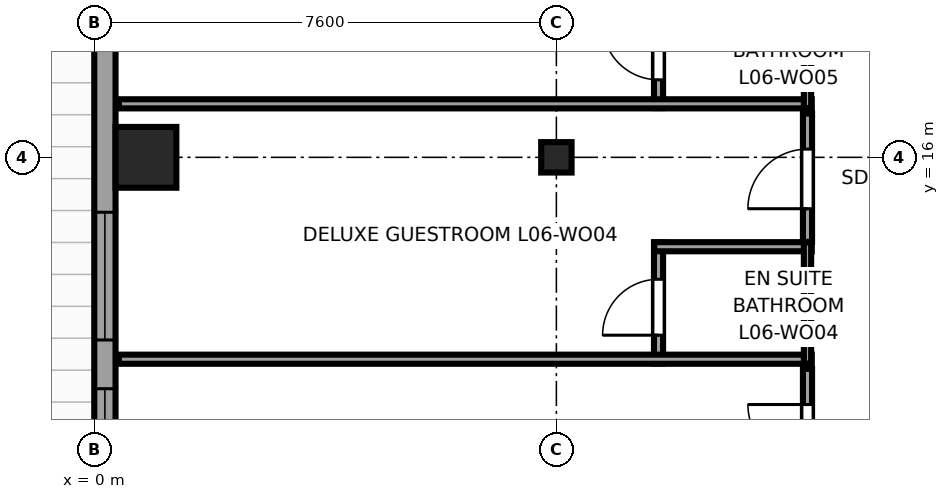
"""IFC4 building model, lengths in metres.
Left out: names, types, materials, properties, quantities, classifications, styles, units other than length and angle.
Written with IfcOpenShell. Run it as: python <this file> out.ifc"""

import sys

from ifc_helpers import new_model, si_unit, direction, frame, frame_2d, origin, origin_2d, place, context, subcontext, project, spatial, rectangle, i_section, extrude, source, transform, mapped, element, fill, save


model = new_model("IFC4")
c1 = context("Model", 3, precision=1e-05, world=origin(), true_north=direction((0.0, 1.0)))
c2 = subcontext(c1, "Body", "Model", "MODEL_VIEW")
j1 = project(units=[si_unit("LENGTHUNIT", "METRE"), si_unit("PLANEANGLEUNIT", "RADIAN")], contexts=[c1])
p1 = place(None, origin())
s1 = spatial("IfcSite", under=j1, at=p1, CompositionType="ELEMENT")
p2 = place(p1, origin())
s2 = spatial("IfcBuilding", under=s1, at=p2, CompositionType="ELEMENT")
p3 = place(p2, frame((0.0, 0.0, 32.0)))
s3 = spatial("IfcBuildingStorey", under=s2, at=p3, CompositionType="ELEMENT", Elevation=32.0)
m1 = source(origin(), c2, "Body", "SweptSolid", [
    extrude(rectangle(XDim=1.0, YDim=1.0, at=origin_2d()), origin(), (0.0, 0.0, 1.0), 3.55),
])
p4 = place(p3, frame((0.85, 16.0, 0.0), z_axis=(0.0, 0.0, 1.0), x_axis=(1.0, 0.0, 0.0)))
e1 = element("IfcColumn", 1, at=p4, inside=s3, PredefinedType="COLUMN", context=c2, shape_type="MappedRepresentation", body=[
    mapped(m1, transform((0.0, 0.0, 0.0), x_axis=(1.0, 0.0, 0.0), y_axis=(0.0, 1.0, 0.0), z_axis=(0.0, 0.0, 1.0), scale=1.0)),
])
m2 = source(origin(), c2, "Body", "SweptSolid", [
    extrude(i_section(OverallWidth=0.5, OverallDepth=0.5, WebThickness=0.028, FlangeThickness=0.045, at=origin_2d()), origin(), (0.0, 0.0, 1.0), 3.55),
])
p5 = place(p3, frame((7.6, 16.0, 0.0), z_axis=(0.0, 0.0, 1.0), x_axis=(1.0, 0.0, 0.0)))
e2 = element("IfcColumn", 2, at=p5, inside=s3, PredefinedType="COLUMN", context=c2, shape_type="MappedRepresentation", body=[
    mapped(m2, transform((0.0, 0.0, 0.0), x_axis=(1.0, 0.0, 0.0), y_axis=(0.0, 1.0, 0.0), z_axis=(0.0, 0.0, 1.0), scale=1.0)),
])
p6 = place(p3, frame((0.175, 41.383, 0.0), z_axis=(0.0, 0.0, 1.0), x_axis=(0.0, -1.0, 0.0)))
e3 = element("IfcWall", 3, at=p6, inside=s3, PredefinedType="SOLIDWALL", context=c2, shape_type="SweptSolid", body=[
    extrude(rectangle(XDim=36.766, YDim=0.35, at=frame_2d((18.383, 0.0))), origin(), (0.0, 0.0, 1.0), 3.37),
])
p7 = place(p6, frame((1.526, 0.0, 0.68)))
e4 = element("IfcOpeningElement", 4, at=p7, cuts=e3, PredefinedType="OPENING", context=c2, shape_type="SweptSolid", body=[
    extrude(rectangle(XDim=2.1, YDim=1.9, at=frame_2d((1.05, 0.95))), frame((0.0, 0.185, 0.0), z_axis=(0.0, -1.0, 0.0), x_axis=(1.0, 0.0, 0.0)), (0.0, 0.0, 1.0), 0.37),
])
p8 = place(p6, frame((4.428, 0.0, 0.68)))
e5 = element("IfcOpeningElement", 5, at=p8, cuts=e3, PredefinedType="OPENING", context=c2, shape_type="SweptSolid", body=[
    extrude(rectangle(XDim=2.1, YDim=1.9, at=frame_2d((1.05, 0.95))), frame((0.0, 0.185, 0.0), z_axis=(0.0, -1.0, 0.0), x_axis=(1.0, 0.0, 0.0)), (0.0, 0.0, 1.0), 0.37),
])
p9 = place(p6, frame((13.381, 0.0, 0.68)))
e6 = element("IfcOpeningElement", 6, at=p9, cuts=e3, PredefinedType="OPENING", context=c2, shape_type="SweptSolid", body=[
    extrude(rectangle(XDim=2.1, YDim=1.9, at=frame_2d((1.05, 0.95))), frame((0.0, 0.185, 0.0), z_axis=(0.0, -1.0, 0.0), x_axis=(1.0, 0.0, 0.0)), (0.0, 0.0, 1.0), 0.37),
])
p10 = place(p6, frame((21.285, 0.0, 0.68)))
e7 = element("IfcOpeningElement", 7, at=p10, cuts=e3, PredefinedType="OPENING", context=c2, shape_type="SweptSolid", body=[
    extrude(rectangle(XDim=2.1, YDim=1.9, at=frame_2d((1.05, 0.95))), frame((0.0, 0.185, 0.0), z_axis=(0.0, -1.0, 0.0), x_axis=(1.0, 0.0, 0.0)), (0.0, 0.0, 1.0), 0.37),
])
p11 = place(p6, frame((26.286, 0.0, 0.68)))
e8 = element("IfcOpeningElement", 8, at=p11, cuts=e3, PredefinedType="OPENING", context=c2, shape_type="SweptSolid", body=[
    extrude(rectangle(XDim=2.1, YDim=1.9, at=frame_2d((1.05, 0.95))), frame((0.0, 0.185, 0.0), z_axis=(0.0, -1.0, 0.0), x_axis=(1.0, 0.0, 0.0)), (0.0, 0.0, 1.0), 0.37),
])
p12 = place(p6, frame((29.188, 0.0, 0.68)))
e9 = element("IfcOpeningElement", 9, at=p12, cuts=e3, PredefinedType="OPENING", context=c2, shape_type="SweptSolid", body=[
    extrude(rectangle(XDim=2.1, YDim=1.9, at=frame_2d((1.05, 0.95))), frame((0.0, 0.185, 0.0), z_axis=(0.0, -1.0, 0.0), x_axis=(1.0, 0.0, 0.0)), (0.0, 0.0, 1.0), 0.37),
])
p13 = place(p6, frame((34.079, 0.0, 0.62)))
e10 = element("IfcOpeningElement", 10, at=p13, cuts=e3, PredefinedType="OPENING", context=c2, shape_type="SweptSolid", body=[
    extrude(rectangle(XDim=1.5, YDim=1.55, at=frame_2d((0.75, 0.775))), frame((0.0, 0.185, 0.0), z_axis=(0.0, -1.0, 0.0), x_axis=(1.0, 0.0, 0.0)), (0.0, 0.0, 1.0), 0.37),
])
p14 = place(p3, frame((9.28, 12.61, 0.0), z_axis=(0.0, 0.0, 1.0), x_axis=(0.0, 1.0, 0.0)))
e11 = element("IfcWall", 11, at=p14, inside=s3, PredefinedType="PARTITIONING", context=c2, shape_type="SweptSolid", body=[
    extrude(rectangle(XDim=1.99, YDim=0.15, at=frame_2d((0.995, 0.0))), origin(), (0.0, 0.0, 1.0), 3.37),
])
p15 = place(p14, frame((0.465, 0.0, 0.0)))
e12 = element("IfcOpeningElement", 12, at=p15, cuts=e11, PredefinedType="OPENING", context=c2, shape_type="SweptSolid", body=[
    extrude(rectangle(XDim=0.92, YDim=2.01, at=frame_2d((0.46, 1.005))), frame((0.0, 0.085, 0.0), z_axis=(0.0, -1.0, 0.0), x_axis=(1.0, 0.0, 0.0)), (0.0, 0.0, 1.0), 0.17),
])
p16 = place(p3, frame((0.405, 12.68, 0.0), z_axis=(0.0, 0.0, 1.0), x_axis=(1.0, 0.0, 0.0)))
e13 = element("IfcWall", 13, at=p16, inside=s3, PredefinedType="PARTITIONING", context=c2, shape_type="SweptSolid", body=[
    extrude(rectangle(XDim=11.395, YDim=0.15, at=frame_2d((5.698, 0.0))), origin(), (0.0, 0.0, 1.0), 3.37),
])
p17 = place(p3, frame((9.21, 14.53, 0.0), z_axis=(0.0, 0.0, 1.0), x_axis=(1.0, 0.0, 0.0)))
e14 = element("IfcWall", 14, at=p17, inside=s3, PredefinedType="PARTITIONING", context=c2, shape_type="SweptSolid", body=[
    extrude(rectangle(XDim=2.59, YDim=0.15, at=frame_2d((1.295, 0.0))), origin(), (0.0, 0.0, 1.0), 3.37),
])
p18 = place(p3, frame((11.73, 12.61, 0.0), z_axis=(0.0, 0.0, 1.0), x_axis=(0.0, 1.0, 0.0)))
e15 = element("IfcWall", 15, at=p18, inside=s3, PredefinedType="PLUMBINGWALL", context=c2, shape_type="SweptSolid", body=[
    extrude(rectangle(XDim=1.99, YDim=0.12, at=frame_2d((0.995, 0.0))), origin(), (0.0, 0.0, 1.0), 3.37),
])
p19 = place(p3, frame((9.28, 16.81, 0.0), z_axis=(0.0, 0.0, 1.0), x_axis=(0.0, 1.0, 0.0)))
e16 = element("IfcWall", 16, at=p19, inside=s3, PredefinedType="PARTITIONING", context=c2, shape_type="SweptSolid", body=[
    extrude(rectangle(XDim=1.99, YDim=0.15, at=frame_2d((0.995, 0.0))), origin(), (0.0, 0.0, 1.0), 3.37),
])
p20 = place(p19, frame((0.465, 0.0, 0.0)))
e17 = element("IfcOpeningElement", 17, at=p20, cuts=e16, PredefinedType="OPENING", context=c2, shape_type="SweptSolid", body=[
    extrude(rectangle(XDim=0.92, YDim=2.01, at=frame_2d((0.46, 1.005))), frame((0.0, 0.085, 0.0), z_axis=(0.0, -1.0, 0.0), x_axis=(1.0, 0.0, 0.0)), (0.0, 0.0, 1.0), 0.17),
])
p21 = place(p3, frame((0.405, 16.88, 0.0), z_axis=(0.0, 0.0, 1.0), x_axis=(1.0, 0.0, 0.0)))
e18 = element("IfcWall", 18, at=p21, inside=s3, PredefinedType="PARTITIONING", context=c2, shape_type="SweptSolid", body=[
    extrude(rectangle(XDim=11.395, YDim=0.15, at=frame_2d((5.698, 0.0))), origin(), (0.0, 0.0, 1.0), 3.37),
])
p22 = place(p3, frame((11.73, 16.81, 0.0), z_axis=(0.0, 0.0, 1.0), x_axis=(0.0, 1.0, 0.0)))
e19 = element("IfcWall", 19, at=p22, inside=s3, PredefinedType="PLUMBINGWALL", context=c2, shape_type="SweptSolid", body=[
    extrude(rectangle(XDim=1.99, YDim=0.12, at=frame_2d((0.995, 0.0))), origin(), (0.0, 0.0, 1.0), 3.37),
])
p23 = place(p3, frame((11.73, 10.41, 0.0), z_axis=(0.0, 0.0, 1.0), x_axis=(0.0, 1.0, 0.0)))
e20 = element("IfcWall", 20, at=p23, inside=s3, PredefinedType="PARTITIONING", context=c2, shape_type="SweptSolid", body=[
    extrude(rectangle(XDim=2.11, YDim=0.15, at=frame_2d((1.055, 0.0))), origin(), (0.0, 0.0, 1.0), 3.37),
])
p24 = place(p23, frame((0.545, 0.0, 0.0)))
e21 = element("IfcOpeningElement", 21, at=p24, cuts=e20, PredefinedType="OPENING", context=c2, shape_type="SweptSolid", body=[
    extrude(rectangle(XDim=0.98, YDim=2.12, at=frame_2d((0.49, 1.06))), frame((0.0, 0.085, 0.0), z_axis=(0.0, -1.0, 0.0), x_axis=(1.0, 0.0, 0.0)), (0.0, 0.0, 1.0), 0.17),
])
p25 = place(p3, frame((11.73, 14.61, 0.0), z_axis=(0.0, 0.0, 1.0), x_axis=(0.0, 1.0, 0.0)))
e22 = element("IfcWall", 22, at=p25, inside=s3, PredefinedType="PARTITIONING", context=c2, shape_type="SweptSolid", body=[
    extrude(rectangle(XDim=2.11, YDim=0.15, at=frame_2d((1.055, 0.0))), origin(), (0.0, 0.0, 1.0), 3.37),
])
p26 = place(p25, frame((0.545, 0.0, 0.0)))
e23 = element("IfcOpeningElement", 23, at=p26, cuts=e22, PredefinedType="OPENING", context=c2, shape_type="SweptSolid", body=[
    extrude(rectangle(XDim=0.98, YDim=2.12, at=frame_2d((0.49, 1.06))), frame((0.0, 0.085, 0.0), z_axis=(0.0, -1.0, 0.0), x_axis=(1.0, 0.0, 0.0)), (0.0, 0.0, 1.0), 0.17),
])
m3 = source(origin(), c2, "Body", "SweptSolid", [
    extrude(rectangle(XDim=2.1, YDim=1.9, at=frame_2d((1.05, 0.95))), frame((0.0, 0.09, 0.0), z_axis=(0.0, -1.0, 0.0), x_axis=(1.0, 0.0, 0.0)), (0.0, 0.0, 1.0), 0.06),
])
p27 = place(p11, origin())
e24 = element("IfcWindow", 24, at=p27, inside=s3, PartitioningType="TRIPLE_PANEL_HORIZONTAL", PredefinedType="WINDOW", context=c2, shape_type="MappedRepresentation", body=[
    mapped(m3, transform((0.0, 0.0, 0.0), x_axis=(1.0, 0.0, 0.0), y_axis=(0.0, 1.0, 0.0), z_axis=(0.0, 0.0, 1.0), scale=1.0)),
])
fill(e8, e24)
p28 = place(p12, origin())
e25 = element("IfcWindow", 25, at=p28, inside=s3, PartitioningType="TRIPLE_PANEL_HORIZONTAL", PredefinedType="WINDOW", context=c2, shape_type="MappedRepresentation", body=[
    mapped(m3, transform((0.0, 0.0, 0.0), x_axis=(1.0, 0.0, 0.0), y_axis=(0.0, 1.0, 0.0), z_axis=(0.0, 0.0, 1.0), scale=1.0)),
])
fill(e9, e25)
m4 = source(origin(), c2, "Body", "SweptSolid", [
    extrude(rectangle(XDim=0.92, YDim=2.01, at=frame_2d((0.46, 1.005))), frame((0.0, 0.025, 0.0), z_axis=(0.0, -1.0, 0.0), x_axis=(1.0, 0.0, 0.0)), (0.0, 0.0, 1.0), 0.05),
])
p29 = place(p15, origin())
e26 = element("IfcDoor", 26, at=p29, inside=s3, OperationType="SINGLE_SWING_LEFT", PredefinedType="DOOR", context=c2, shape_type="MappedRepresentation", body=[
    mapped(m4, transform((0.0, 0.0, 0.0), x_axis=(1.0, 0.0, 0.0), y_axis=(0.0, 1.0, 0.0), z_axis=(0.0, 0.0, 1.0), scale=1.0)),
])
fill(e12, e26)
p30 = place(p20, origin())
e27 = element("IfcDoor", 27, at=p30, inside=s3, OperationType="SINGLE_SWING_RIGHT", PredefinedType="DOOR", context=c2, shape_type="MappedRepresentation", body=[
    mapped(m4, transform((0.0, 0.0, 0.0), x_axis=(1.0, 0.0, 0.0), y_axis=(0.0, 1.0, 0.0), z_axis=(0.0, 0.0, 1.0), scale=1.0)),
])
fill(e17, e27)
m5 = source(origin(), c2, "Body", "SweptSolid", [
    extrude(rectangle(XDim=0.98, YDim=2.12, at=frame_2d((0.49, 1.06))), frame((0.0, 0.025, 0.0), z_axis=(0.0, -1.0, 0.0), x_axis=(1.0, 0.0, 0.0)), (0.0, 0.0, 1.0), 0.05),
])
p31 = place(p24, origin())
e28 = element("IfcDoor", 28, at=p31, inside=s3, OperationType="SINGLE_SWING_RIGHT", PredefinedType="DOOR", context=c2, shape_type="MappedRepresentation", body=[
    mapped(m5, transform((0.0, 0.0, 0.0), x_axis=(1.0, 0.0, 0.0), y_axis=(0.0, 1.0, 0.0), z_axis=(0.0, 0.0, 1.0), scale=1.0)),
])
fill(e21, e28)
p32 = place(p26, origin())
e29 = element("IfcDoor", 29, at=p32, inside=s3, OperationType="SINGLE_SWING_LEFT", PredefinedType="DOOR", context=c2, shape_type="MappedRepresentation", body=[
    mapped(m5, transform((0.0, 0.0, 0.0), x_axis=(1.0, 0.0, 0.0), y_axis=(0.0, 1.0, 0.0), z_axis=(0.0, 0.0, 1.0), scale=1.0)),
])
fill(e23, e29)
save(model, sys.argv[1])
